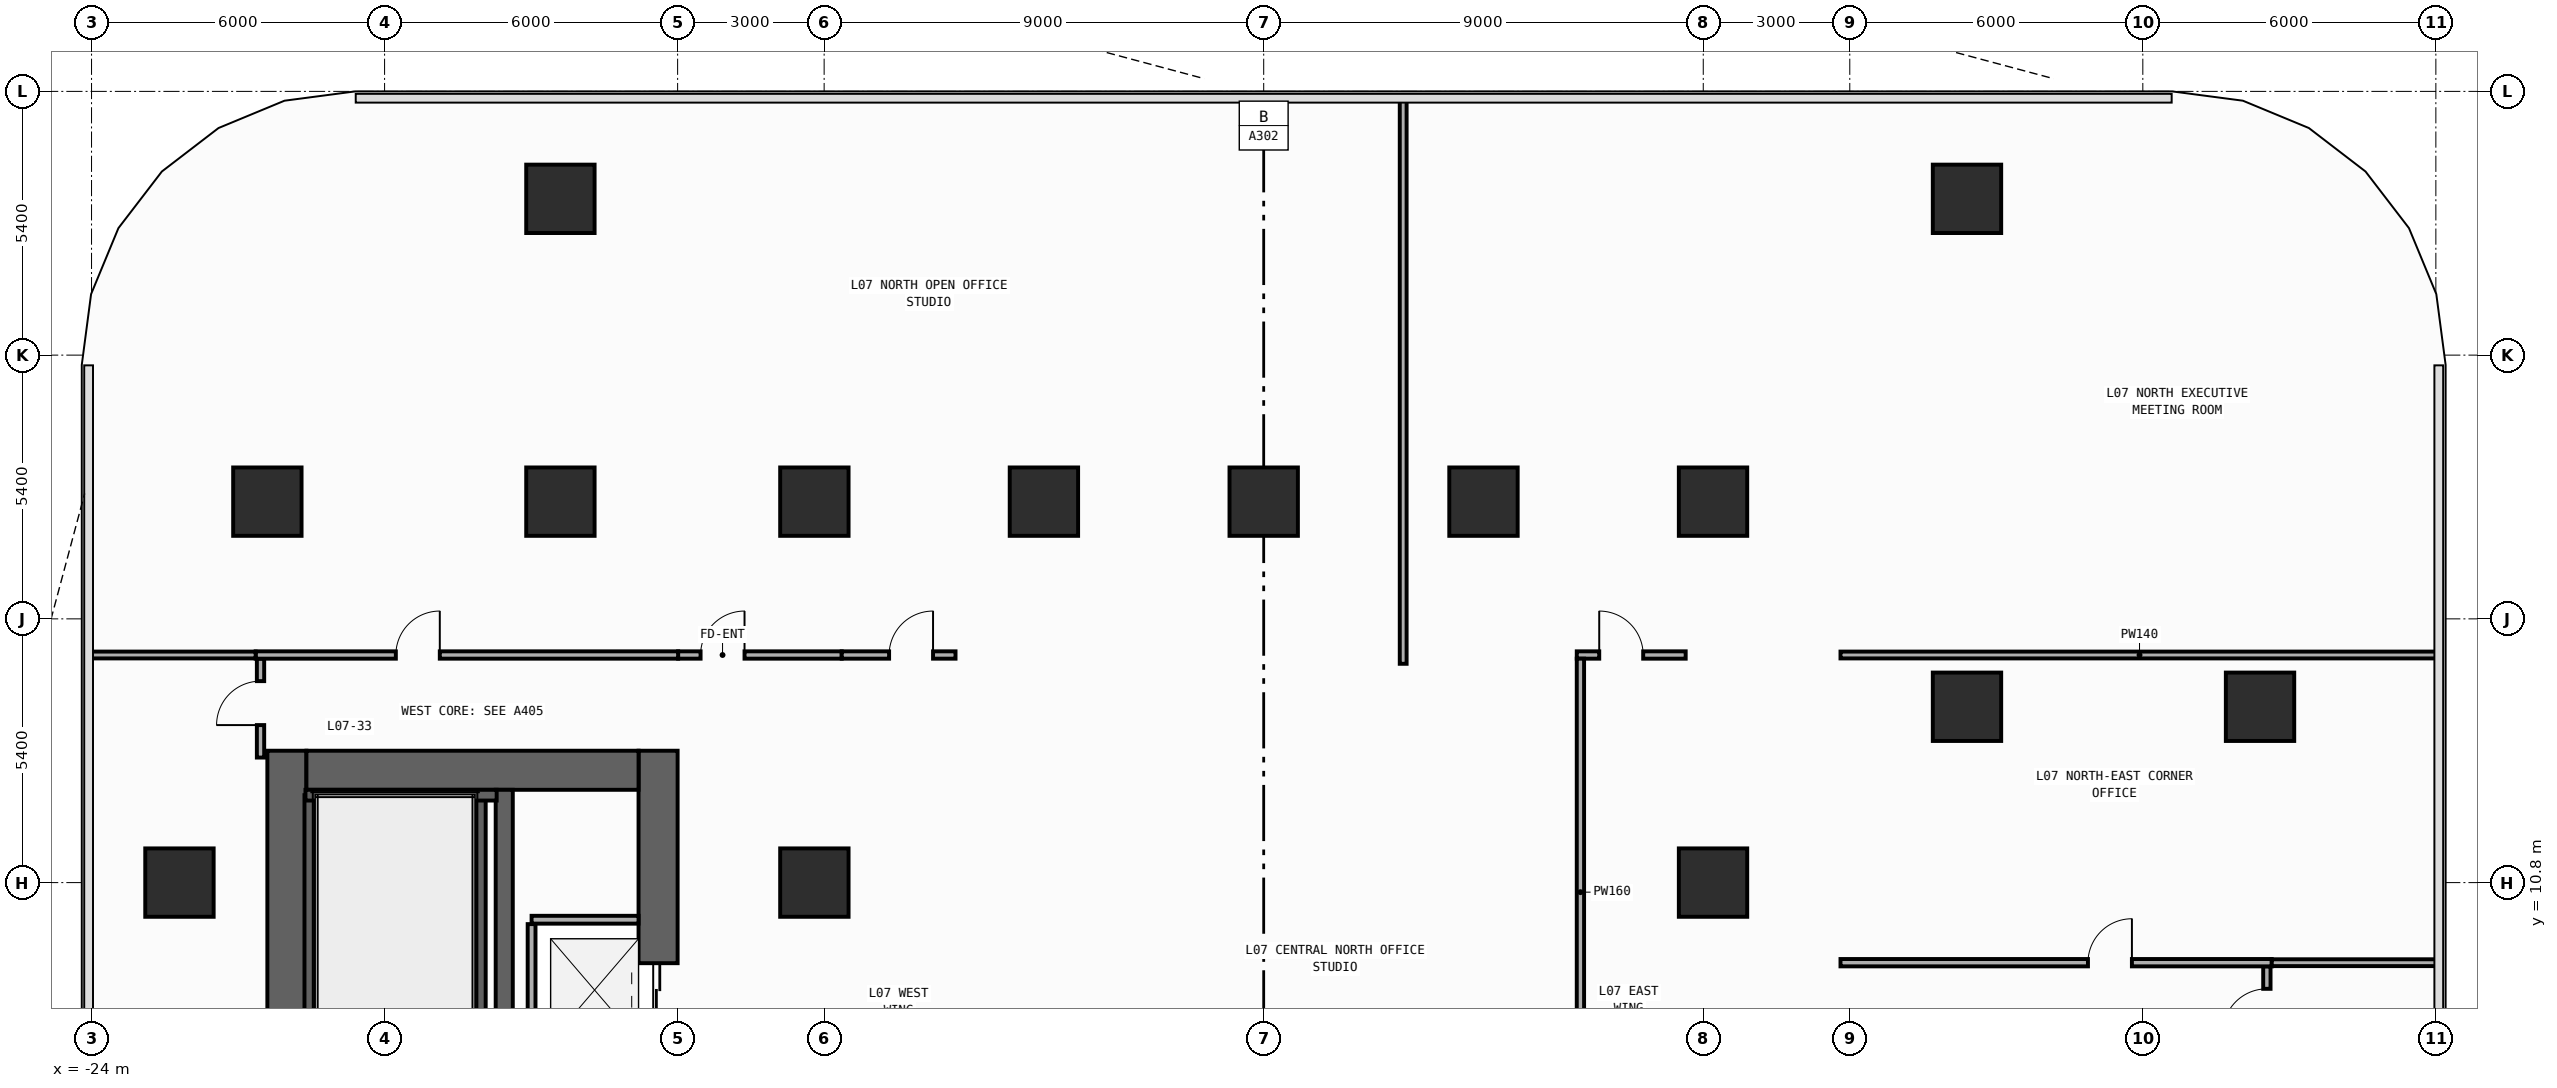
"""IFC4 building model, lengths in metres.
Left out: names, types, materials, properties, quantities, classifications, styles, units other than length and angle.
Written with IfcOpenShell. Run it as: python <this file> out.ifc"""

import sys

from ifc_helpers import new_model, si_unit, direction, frame, frame_2d, origin, origin_2d, place, context, subcontext, project, spatial, rectangle, extrude, element, fill, save


model = new_model("IFC4")
c1 = context("Model", 3, precision=1e-05, world=origin(), true_north=direction((0.0, 1.0)))
c2 = subcontext(c1, "Body", "Model", "MODEL_VIEW")
j1 = project(units=[si_unit("LENGTHUNIT", "METRE"), si_unit("PLANEANGLEUNIT", "RADIAN")], contexts=[c1])
p1 = place(None, origin())
s1 = spatial("IfcSite", under=j1, at=p1, CompositionType="ELEMENT")
p2 = place(p1, origin())
s2 = spatial("IfcBuilding", under=s1, at=p2, CompositionType="ELEMENT")
p3 = place(p2, frame((0.0, 0.0, 30.2)))
s3 = spatial("IfcBuildingStorey", under=s2, at=p3, CompositionType="ELEMENT", Elevation=30.2)
p4 = place(p3, frame((-20.0, -13.5, 0.0), z_axis=(0.0, 0.0, 1.0), x_axis=(0.0, 1.0, 0.0)))
e1 = element("IfcWall", 1, at=p4, inside=s3, PredefinedType="SHEAR", context=c2, shape_type="SweptSolid", body=[
    extrude(rectangle(XDim=27.0, YDim=0.8, at=frame_2d((13.5, 0.0))), origin(), (0.0, 0.0, 1.0), 3.94),
])
p5 = place(p3, frame((-12.4, -13.5, 0.0), z_axis=(0.0, 0.0, 1.0), x_axis=(0.0, 1.0, 0.0)))
e2 = element("IfcWall", 2, at=p5, inside=s3, PredefinedType="SHEAR", context=c2, shape_type="SweptSolid", body=[
    extrude(rectangle(XDim=27.0, YDim=0.8, at=frame_2d((13.5, 0.0))), origin(), (0.0, 0.0, 1.0), 3.94),
])
p6 = place(p5, frame((21.55, 0.0, 0.0)))
e3 = element("IfcOpeningElement", 3, at=p6, cuts=e2, PredefinedType="OPENING", context=c2, shape_type="SweptSolid", body=[
    extrude(rectangle(XDim=1.1, YDim=2.2, at=frame_2d((0.55, 1.1))), frame((0.0, 0.41, 0.0), z_axis=(0.0, -1.0, 0.0), x_axis=(1.0, 0.0, 0.0)), (0.0, 0.0, 1.0), 0.82),
])
p7 = place(p5, frame((18.35, 0.0, 0.0)))
e4 = element("IfcOpeningElement", 4, at=p7, cuts=e2, PredefinedType="OPENING", context=c2, shape_type="SweptSolid", body=[
    extrude(rectangle(XDim=1.1, YDim=2.2, at=frame_2d((0.55, 1.1))), frame((0.0, 0.41, 0.0), z_axis=(0.0, -1.0, 0.0), x_axis=(1.0, 0.0, 0.0)), (0.0, 0.0, 1.0), 0.82),
])
p8 = place(p5, frame((15.15, 0.0, 0.0)))
e5 = element("IfcOpeningElement", 5, at=p8, cuts=e2, PredefinedType="OPENING", context=c2, shape_type="SweptSolid", body=[
    extrude(rectangle(XDim=1.1, YDim=2.2, at=frame_2d((0.55, 1.1))), frame((0.0, 0.41, 0.0), z_axis=(0.0, -1.0, 0.0), x_axis=(1.0, 0.0, 0.0)), (0.0, 0.0, 1.0), 0.82),
])
p9 = place(p5, frame((10.35, 0.0, 0.0)))
e6 = element("IfcOpeningElement", 6, at=p9, cuts=e2, PredefinedType="OPENING", context=c2, shape_type="SweptSolid", body=[
    extrude(rectangle(XDim=1.1, YDim=2.2, at=frame_2d((0.55, 1.1))), frame((0.0, 0.41, 0.0), z_axis=(0.0, -1.0, 0.0), x_axis=(1.0, 0.0, 0.0)), (0.0, 0.0, 1.0), 0.82),
])
p10 = place(p5, frame((7.15, 0.0, 0.0)))
e7 = element("IfcOpeningElement", 7, at=p10, cuts=e2, PredefinedType="OPENING", context=c2, shape_type="SweptSolid", body=[
    extrude(rectangle(XDim=1.1, YDim=2.2, at=frame_2d((0.55, 1.1))), frame((0.0, 0.41, 0.0), z_axis=(0.0, -1.0, 0.0), x_axis=(1.0, 0.0, 0.0)), (0.0, 0.0, 1.0), 0.82),
])
p11 = place(p5, frame((3.95, 0.0, 0.0)))
e8 = element("IfcOpeningElement", 8, at=p11, cuts=e2, PredefinedType="OPENING", context=c2, shape_type="SweptSolid", body=[
    extrude(rectangle(XDim=1.1, YDim=2.2, at=frame_2d((0.55, 1.1))), frame((0.0, 0.41, 0.0), z_axis=(0.0, -1.0, 0.0), x_axis=(1.0, 0.0, 0.0)), (0.0, 0.0, 1.0), 0.82),
])
p12 = place(p5, frame((12.725, 0.0, 0.0)))
e9 = element("IfcOpeningElement", 9, at=p12, cuts=e2, PredefinedType="OPENING", context=c2, shape_type="SweptSolid", body=[
    extrude(rectangle(XDim=1.15, YDim=2.2, at=frame_2d((0.575, 1.1))), frame((0.0, 0.41, 0.0), z_axis=(0.0, -1.0, 0.0), x_axis=(1.0, 0.0, 0.0)), (0.0, 0.0, 1.0), 0.82),
])
p13 = place(p5, frame((1.625, 0.0, 0.0)))
e10 = element("IfcOpeningElement", 10, at=p13, cuts=e2, PredefinedType="OPENING", context=c2, shape_type="SweptSolid", body=[
    extrude(rectangle(XDim=0.85, YDim=2.1, at=frame_2d((0.425, 1.05))), frame((0.0, 0.41, 0.0), z_axis=(0.0, -1.0, 0.0), x_axis=(1.0, 0.0, 0.0)), (0.0, 0.0, 1.0), 0.82),
])
p14 = place(p3, frame((-19.6, 13.1, 0.0), z_axis=(0.0, 0.0, 1.0), x_axis=(1.0, 0.0, 0.0)))
e11 = element("IfcWall", 11, at=p14, inside=s3, PredefinedType="SHEAR", context=c2, shape_type="SweptSolid", body=[
    extrude(rectangle(XDim=6.8, YDim=0.8, at=frame_2d((3.4, 0.0))), origin(), (0.0, 0.0, 1.0), 3.94),
])
p15 = place(p3, frame((-15.55, -12.7, 0.0), z_axis=(0.0, 0.0, 1.0), x_axis=(0.0, 1.0, 0.0)))
e12 = element("IfcWall", 12, at=p15, inside=s3, PredefinedType="SHEAR", context=c2, shape_type="SweptSolid", body=[
    extrude(rectangle(XDim=25.4, YDim=0.35, at=frame_2d((12.7, 0.0))), origin(), (0.0, 0.0, 1.0), 3.94),
])
p16 = place(p15, frame((11.925, 0.0, 0.0)))
e13 = element("IfcOpeningElement", 13, at=p16, cuts=e12, PredefinedType="OPENING", context=c2, shape_type="SweptSolid", body=[
    extrude(rectangle(XDim=1.15, YDim=2.2, at=frame_2d((0.575, 1.1))), frame((0.0, 0.185, 0.0), z_axis=(0.0, -1.0, 0.0), x_axis=(1.0, 0.0, 0.0)), (0.0, 0.0, 1.0), 0.37),
])
p17 = place(p15, frame((0.825, 0.0, 0.0)))
e14 = element("IfcOpeningElement", 14, at=p17, cuts=e12, PredefinedType="OPENING", context=c2, shape_type="SweptSolid", body=[
    extrude(rectangle(XDim=0.85, YDim=2.1, at=frame_2d((0.425, 1.05))), frame((0.0, 0.185, 0.0), z_axis=(0.0, -1.0, 0.0), x_axis=(1.0, 0.0, 0.0)), (0.0, 0.0, 1.0), 0.37),
])
for number, where, z_axis, x_axis in (
    (15, (-16.04, 1.29, 0.0), (0.0, 0.0, 1.0), (0.0, 1.0, 0.0)),
    (16, (-19.53, 1.29, 0.0), (0.0, 0.0, 1.0), (0.0, 1.0, 0.0)),
):
    element("IfcWall", number, at=place(p3, frame(where, z_axis=z_axis, x_axis=x_axis)), inside=s3, PredefinedType="SHEAR", context=c2, shape_type="SweptSolid", body=[
        extrude(rectangle(XDim=11.3, YDim=0.22, at=frame_2d((5.65, 0.0))), origin(), (0.0, 0.0, 1.0), 3.94),
    ])
p18 = place(p3, frame((-19.62, 12.59, 0.0), z_axis=(0.0, 0.0, 1.0), x_axis=(1.0, 0.0, 0.0)))
e17 = element("IfcWall", 17, at=p18, inside=s3, PredefinedType="SHEAR", context=c2, shape_type="SweptSolid", body=[
    extrude(rectangle(XDim=3.915, YDim=0.22, at=frame_2d((1.958, 0.0))), origin(), (0.0, 0.0, 1.0), 3.94),
])
for number, where, z_axis, x_axis in (
    (18, (-9.2, 10.8, 0.0), (0.0, 0.0, 1.0), (1.0, 0.0, 0.0)),
    (19, (-9.2, 18.6, 0.0), (0.0, 0.0, 1.0), (1.0, 0.0, 0.0)),
    (20, (9.2, 10.8, 0.0), (0.0, 0.0, 1.0), (1.0, 0.0, 0.0)),
    (21, (9.2, 18.6, 0.0), (0.0, 0.0, 1.0), (1.0, 0.0, 0.0)),
    (22, (-20.4, 18.6, 0.0), (0.0, 0.0, 1.0), (1.0, 0.0, 0.0)),
    (23, (20.4, 14.4, 0.0), (0.0, 0.0, 1.0), (1.0, 0.0, 0.0)),
    (24, (-14.4, 18.6, 0.0), (0.0, 0.0, 1.0), (1.0, 0.0, 0.0)),
    (25, (14.4, 14.4, 0.0), (0.0, 0.0, 1.0), (1.0, 0.0, 0.0)),
    (26, (-4.5, 18.6, 0.0), (0.0, 0.0, 1.0), (1.0, 0.0, 0.0)),
    (27, (0.0, 18.6, 0.0), (0.0, 0.0, 1.0), (1.0, 0.0, 0.0)),
    (28, (4.5, 18.6, 0.0), (0.0, 0.0, 1.0), (1.0, 0.0, 0.0)),
    (29, (-22.2, 10.8, 0.0), (0.0, 0.0, 1.0), (1.0, 0.0, 0.0)),
    (30, (-14.4, 24.8, 0.0), (0.0, 0.0, 1.0), (1.0, 0.0, 0.0)),
    (31, (14.4, 24.8, 0.0), (0.0, 0.0, 1.0), (1.0, 0.0, 0.0)),
):
    element("IfcColumn", number, at=place(p3, frame(where, z_axis=z_axis, x_axis=x_axis)), inside=s3, PredefinedType="COLUMN", context=c2, shape_type="SweptSolid", body=[
        extrude(rectangle(XDim=1.4, YDim=1.4, at=origin_2d()), origin(), (0.0, 0.0, 1.0), 4.2),
    ])
p19 = place(p3, frame((-14.99, 10.04, 0.0), z_axis=(0.0, 0.0, 1.0), x_axis=(1.0, 0.0, 0.0)))
e32 = element("IfcWall", 32, at=p19, inside=s3, PredefinedType="STANDARD", context=c2, shape_type="SweptSolid", body=[
    extrude(rectangle(XDim=2.19, YDim=0.16, at=frame_2d((1.095, 0.0))), origin(), (0.0, 0.0, 1.0), 3.94),
])
p20 = place(p3, frame((-14.99, 7.25, 0.0), z_axis=(0.0, 0.0, 1.0), x_axis=(0.0, 1.0, 0.0)))
e33 = element("IfcWall", 33, at=p20, inside=s3, PredefinedType="STANDARD", context=c2, shape_type="SweptSolid", body=[
    extrude(rectangle(XDim=2.7, YDim=0.16, at=frame_2d((1.35, 0.0))), origin(), (0.0, 0.0, 1.0), 3.94),
])
p21 = place(p3, frame((-11.99, 15.46, 0.0), z_axis=(0.0, 0.0, 1.0), x_axis=(1.0, 0.0, 0.0)))
e34 = element("IfcWall", 34, at=p21, inside=s3, PredefinedType="PARTITIONING", context=c2, shape_type="SweptSolid", body=[
    extrude(rectangle(XDim=3.35, YDim=0.15, at=frame_2d((1.675, 0.0))), origin(), (0.0, 0.0, 1.0), 3.94),
])
p22 = place(p21, frame((0.46, 0.0, 0.0)))
e35 = element("IfcOpeningElement", 35, at=p22, cuts=e34, PredefinedType="OPENING", context=c2, shape_type="SweptSolid", body=[
    extrude(rectangle(XDim=0.9, YDim=2.15, at=frame_2d((0.45, 1.075))), frame((0.0, 0.085, 0.0), z_axis=(0.0, -1.0, 0.0), x_axis=(1.0, 0.0, 0.0)), (0.0, 0.0, 1.0), 0.17),
])
p23 = place(p3, frame((-8.64, 15.46, 0.0), z_axis=(0.0, 0.0, 1.0), x_axis=(1.0, 0.0, 0.0)))
e36 = element("IfcWall", 36, at=p23, inside=s3, PredefinedType="PARTITIONING", context=c2, shape_type="SweptSolid", body=[
    extrude(rectangle(XDim=2.33, YDim=0.15, at=frame_2d((1.165, 0.0))), origin(), (0.0, 0.0, 1.0), 3.94),
])
p24 = place(p23, frame((0.97, 0.0, 0.0)))
e37 = element("IfcOpeningElement", 37, at=p24, cuts=e36, PredefinedType="OPENING", context=c2, shape_type="SweptSolid", body=[
    extrude(rectangle(XDim=0.9, YDim=2.15, at=frame_2d((0.45, 1.075))), frame((0.0, 0.085, 0.0), z_axis=(0.0, -1.0, 0.0), x_axis=(1.0, 0.0, 0.0)), (0.0, 0.0, 1.0), 0.17),
])
p25 = place(p3, frame((6.41, 15.46, 0.0), z_axis=(0.0, 0.0, 1.0), x_axis=(1.0, 0.0, 0.0)))
e38 = element("IfcWall", 38, at=p25, inside=s3, PredefinedType="PARTITIONING", context=c2, shape_type="SweptSolid", body=[
    extrude(rectangle(XDim=2.23, YDim=0.15, at=frame_2d((1.115, 0.0))), origin(), (0.0, 0.0, 1.0), 3.94),
])
p26 = place(p25, frame((0.46, 0.0, 0.0)))
e39 = element("IfcOpeningElement", 39, at=p26, cuts=e38, PredefinedType="OPENING", context=c2, shape_type="SweptSolid", body=[
    extrude(rectangle(XDim=0.9, YDim=2.15, at=frame_2d((0.45, 1.075))), frame((0.0, 0.085, 0.0), z_axis=(0.0, -1.0, 0.0), x_axis=(1.0, 0.0, 0.0)), (0.0, 0.0, 1.0), 0.17),
])
p27 = place(p3, frame((6.485, -3.02, 0.0), z_axis=(0.0, 0.0, 1.0), x_axis=(0.0, 1.0, 0.0)))
e40 = element("IfcWall", 40, at=p27, inside=s3, PredefinedType="PARTITIONING", context=c2, shape_type="SweptSolid", body=[
    extrude(rectangle(XDim=18.405, YDim=0.15, at=frame_2d((9.203, 0.0))), origin(), (0.0, 0.0, 1.0), 3.94),
])
p28 = place(p27, frame((7.944, 0.0, 0.0)))
e41 = element("IfcOpeningElement", 41, at=p28, cuts=e40, PredefinedType="OPENING", context=c2, shape_type="SweptSolid", body=[
    extrude(rectangle(XDim=0.9, YDim=2.15, at=frame_2d((0.45, 1.075))), frame((0.0, 0.085, 0.0), z_axis=(0.0, -1.0, 0.0), x_axis=(1.0, 0.0, 0.0)), (0.0, 0.0, 1.0), 0.17),
])
p29 = place(p3, frame((-20.54, 13.36, 0.0), z_axis=(0.0, 0.0, 1.0), x_axis=(0.0, 1.0, 0.0)))
e42 = element("IfcWall", 42, at=p29, inside=s3, PredefinedType="PARTITIONING", context=c2, shape_type="SweptSolid", body=[
    extrude(rectangle(XDim=2.025, YDim=0.15, at=frame_2d((1.012, 0.0))), origin(), (0.0, 0.0, 1.0), 3.94),
])
p30 = place(p29, frame((0.665, 0.0, 0.0)))
e43 = element("IfcOpeningElement", 43, at=p30, cuts=e42, PredefinedType="OPENING", context=c2, shape_type="SweptSolid", body=[
    extrude(rectangle(XDim=0.9, YDim=2.15, at=frame_2d((0.45, 1.075))), frame((0.0, 0.085, 0.0), z_axis=(0.0, -1.0, 0.0), x_axis=(1.0, 0.0, 0.0)), (0.0, 0.0, 1.0), 0.17),
])
p31 = place(p3, frame((-20.64, 15.46, 0.0), z_axis=(0.0, 0.0, 1.0), x_axis=(1.0, 0.0, 0.0)))
e44 = element("IfcWall", 44, at=p31, inside=s3, PredefinedType="PARTITIONING", context=c2, shape_type="SweptSolid", body=[
    extrude(rectangle(XDim=8.65, YDim=0.15, at=frame_2d((4.325, 0.0))), origin(), (0.0, 0.0, 1.0), 3.94),
])
p32 = place(p31, frame((2.871, 0.0, 0.0)))
e45 = element("IfcOpeningElement", 45, at=p32, cuts=e44, PredefinedType="OPENING", context=c2, shape_type="SweptSolid", body=[
    extrude(rectangle(XDim=0.9, YDim=2.15, at=frame_2d((0.45, 1.075))), frame((0.0, 0.085, 0.0), z_axis=(0.0, -1.0, 0.0), x_axis=(1.0, 0.0, 0.0)), (0.0, 0.0, 1.0), 0.17),
])
p33 = place(p3, frame((20.54, 7.06, 0.0), z_axis=(0.0, 0.0, 1.0), x_axis=(0.0, 1.0, 0.0)))
e46 = element("IfcWall", 46, at=p33, inside=s3, PredefinedType="PARTITIONING", context=c2, shape_type="SweptSolid", body=[
    extrude(rectangle(XDim=2.025, YDim=0.15, at=frame_2d((1.012, 0.0))), origin(), (0.0, 0.0, 1.0), 3.94),
])
p34 = place(p33, frame((0.665, 0.0, 0.0)))
e47 = element("IfcOpeningElement", 47, at=p34, cuts=e46, PredefinedType="OPENING", context=c2, shape_type="SweptSolid", body=[
    extrude(rectangle(XDim=0.9, YDim=2.15, at=frame_2d((0.45, 1.075))), frame((0.0, 0.085, 0.0), z_axis=(0.0, -1.0, 0.0), x_axis=(1.0, 0.0, 0.0)), (0.0, 0.0, 1.0), 0.17),
])
p35 = place(p3, frame((11.81, 9.16, 0.0), z_axis=(0.0, 0.0, 1.0), x_axis=(1.0, 0.0, 0.0)))
e48 = element("IfcWall", 48, at=p35, inside=s3, PredefinedType="PARTITIONING", context=c2, shape_type="SweptSolid", body=[
    extrude(rectangle(XDim=8.83, YDim=0.15, at=frame_2d((4.415, 0.0))), origin(), (0.0, 0.0, 1.0), 3.94),
])
p36 = place(p35, frame((5.067, 0.0, 0.0)))
e49 = element("IfcOpeningElement", 49, at=p36, cuts=e48, PredefinedType="OPENING", context=c2, shape_type="SweptSolid", body=[
    extrude(rectangle(XDim=0.9, YDim=2.15, at=frame_2d((0.45, 1.075))), frame((0.0, 0.085, 0.0), z_axis=(0.0, -1.0, 0.0), x_axis=(1.0, 0.0, 0.0)), (0.0, 0.0, 1.0), 0.17),
])
for number, where, z_axis, x_axis in (
    (50, (-24.055, 15.46, 0.0), (0.0, 0.0, 1.0), (1.0, 0.0, 0.0)),
    (51, (20.64, 9.16, 0.0), (0.0, 0.0, 1.0), (1.0, 0.0, 0.0)),
):
    element("IfcWall", number, at=place(p3, frame(where, z_axis=z_axis, x_axis=x_axis)), inside=s3, PredefinedType="PARTITIONING", context=c2, shape_type="SweptSolid", body=[
        extrude(rectangle(XDim=3.415, YDim=0.14, at=frame_2d((1.708, 0.0))), origin(), (0.0, 0.0, 1.0), 3.94),
    ])
p37 = place(p3, frame((11.81, 15.46, 0.0), z_axis=(0.0, 0.0, 1.0), x_axis=(1.0, 0.0, 0.0)))
e52 = element("IfcWall", 52, at=p37, inside=s3, PredefinedType="PARTITIONING", context=c2, shape_type="SweptSolid", body=[
    extrude(rectangle(XDim=12.245, YDim=0.14, at=frame_2d((6.123, 0.0))), origin(), (0.0, 0.0, 1.0), 3.94),
])
p38 = place(p3, frame((2.856, 15.28, 0.0), z_axis=(0.0, 0.0, 1.0), x_axis=(0.0, 1.0, 0.0)))
e53 = element("IfcWall", 53, at=p38, inside=s3, PredefinedType="PARTITIONING", context=c2, shape_type="SweptSolid", body=[
    extrude(rectangle(XDim=11.575, YDim=0.14, at=frame_2d((5.788, 0.0))), origin(), (0.0, 0.0, 1.0), 3.94),
])
p39 = place(p6, origin())
e54 = element("IfcDoor", 54, at=p39, inside=s3, OperationType="DOUBLE_DOOR_SLIDING", PredefinedType="DOOR", context=c2, shape_type="SweptSolid", body=[
    extrude(rectangle(XDim=1.1, YDim=2.2, at=frame_2d((0.55, 1.1))), frame((0.0, 0.025, 0.0), z_axis=(0.0, -1.0, 0.0), x_axis=(1.0, 0.0, 0.0)), (0.0, 0.0, 1.0), 0.05),
])
fill(e3, e54)
p40 = place(p22, origin())
e55 = element("IfcDoor", 55, at=p40, inside=s3, OperationType="SINGLE_SWING_RIGHT", PredefinedType="DOOR", context=c2, shape_type="SweptSolid", body=[
    extrude(rectangle(XDim=0.9, YDim=2.15, at=frame_2d((0.45, 1.075))), frame((0.0, 0.025, 0.0), z_axis=(0.0, -1.0, 0.0), x_axis=(1.0, 0.0, 0.0)), (0.0, 0.0, 1.0), 0.05),
])
fill(e35, e55)
p41 = place(p24, origin())
e56 = element("IfcDoor", 56, at=p41, inside=s3, OperationType="SINGLE_SWING_RIGHT", PredefinedType="DOOR", context=c2, shape_type="SweptSolid", body=[
    extrude(rectangle(XDim=0.9, YDim=2.15, at=frame_2d((0.45, 1.075))), frame((0.0, 0.025, 0.0), z_axis=(0.0, -1.0, 0.0), x_axis=(1.0, 0.0, 0.0)), (0.0, 0.0, 1.0), 0.05),
])
fill(e37, e56)
p42 = place(p26, origin())
e57 = element("IfcDoor", 57, at=p42, inside=s3, OperationType="SINGLE_SWING_LEFT", PredefinedType="DOOR", context=c2, shape_type="SweptSolid", body=[
    extrude(rectangle(XDim=0.9, YDim=2.15, at=frame_2d((0.45, 1.075))), frame((0.0, 0.025, 0.0), z_axis=(0.0, -1.0, 0.0), x_axis=(1.0, 0.0, 0.0)), (0.0, 0.0, 1.0), 0.05),
])
fill(e39, e57)
p43 = place(p30, origin())
e58 = element("IfcDoor", 58, at=p43, inside=s3, OperationType="SINGLE_SWING_LEFT", PredefinedType="DOOR", context=c2, shape_type="SweptSolid", body=[
    extrude(rectangle(XDim=0.9, YDim=2.15, at=frame_2d((0.45, 1.075))), frame((0.0, 0.025, 0.0), z_axis=(0.0, -1.0, 0.0), x_axis=(1.0, 0.0, 0.0)), (0.0, 0.0, 1.0), 0.05),
])
fill(e43, e58)
p44 = place(p32, origin())
e59 = element("IfcDoor", 59, at=p44, inside=s3, OperationType="SINGLE_SWING_RIGHT", PredefinedType="DOOR", context=c2, shape_type="SweptSolid", body=[
    extrude(rectangle(XDim=0.9, YDim=2.15, at=frame_2d((0.45, 1.075))), frame((0.0, 0.025, 0.0), z_axis=(0.0, -1.0, 0.0), x_axis=(1.0, 0.0, 0.0)), (0.0, 0.0, 1.0), 0.05),
])
fill(e45, e59)
p45 = place(p34, origin())
e60 = element("IfcDoor", 60, at=p45, inside=s3, OperationType="SINGLE_SWING_LEFT", PredefinedType="DOOR", context=c2, shape_type="SweptSolid", body=[
    extrude(rectangle(XDim=0.9, YDim=2.15, at=frame_2d((0.45, 1.075))), frame((0.0, 0.025, 0.0), z_axis=(0.0, -1.0, 0.0), x_axis=(1.0, 0.0, 0.0)), (0.0, 0.0, 1.0), 0.05),
])
fill(e47, e60)
p46 = place(p36, origin())
e61 = element("IfcDoor", 61, at=p46, inside=s3, OperationType="SINGLE_SWING_RIGHT", PredefinedType="DOOR", context=c2, shape_type="SweptSolid", body=[
    extrude(rectangle(XDim=0.9, YDim=2.15, at=frame_2d((0.45, 1.075))), frame((0.0, 0.025, 0.0), z_axis=(0.0, -1.0, 0.0), x_axis=(1.0, 0.0, 0.0)), (0.0, 0.0, 1.0), 0.05),
])
fill(e49, e61)
save(model, sys.argv[1])
